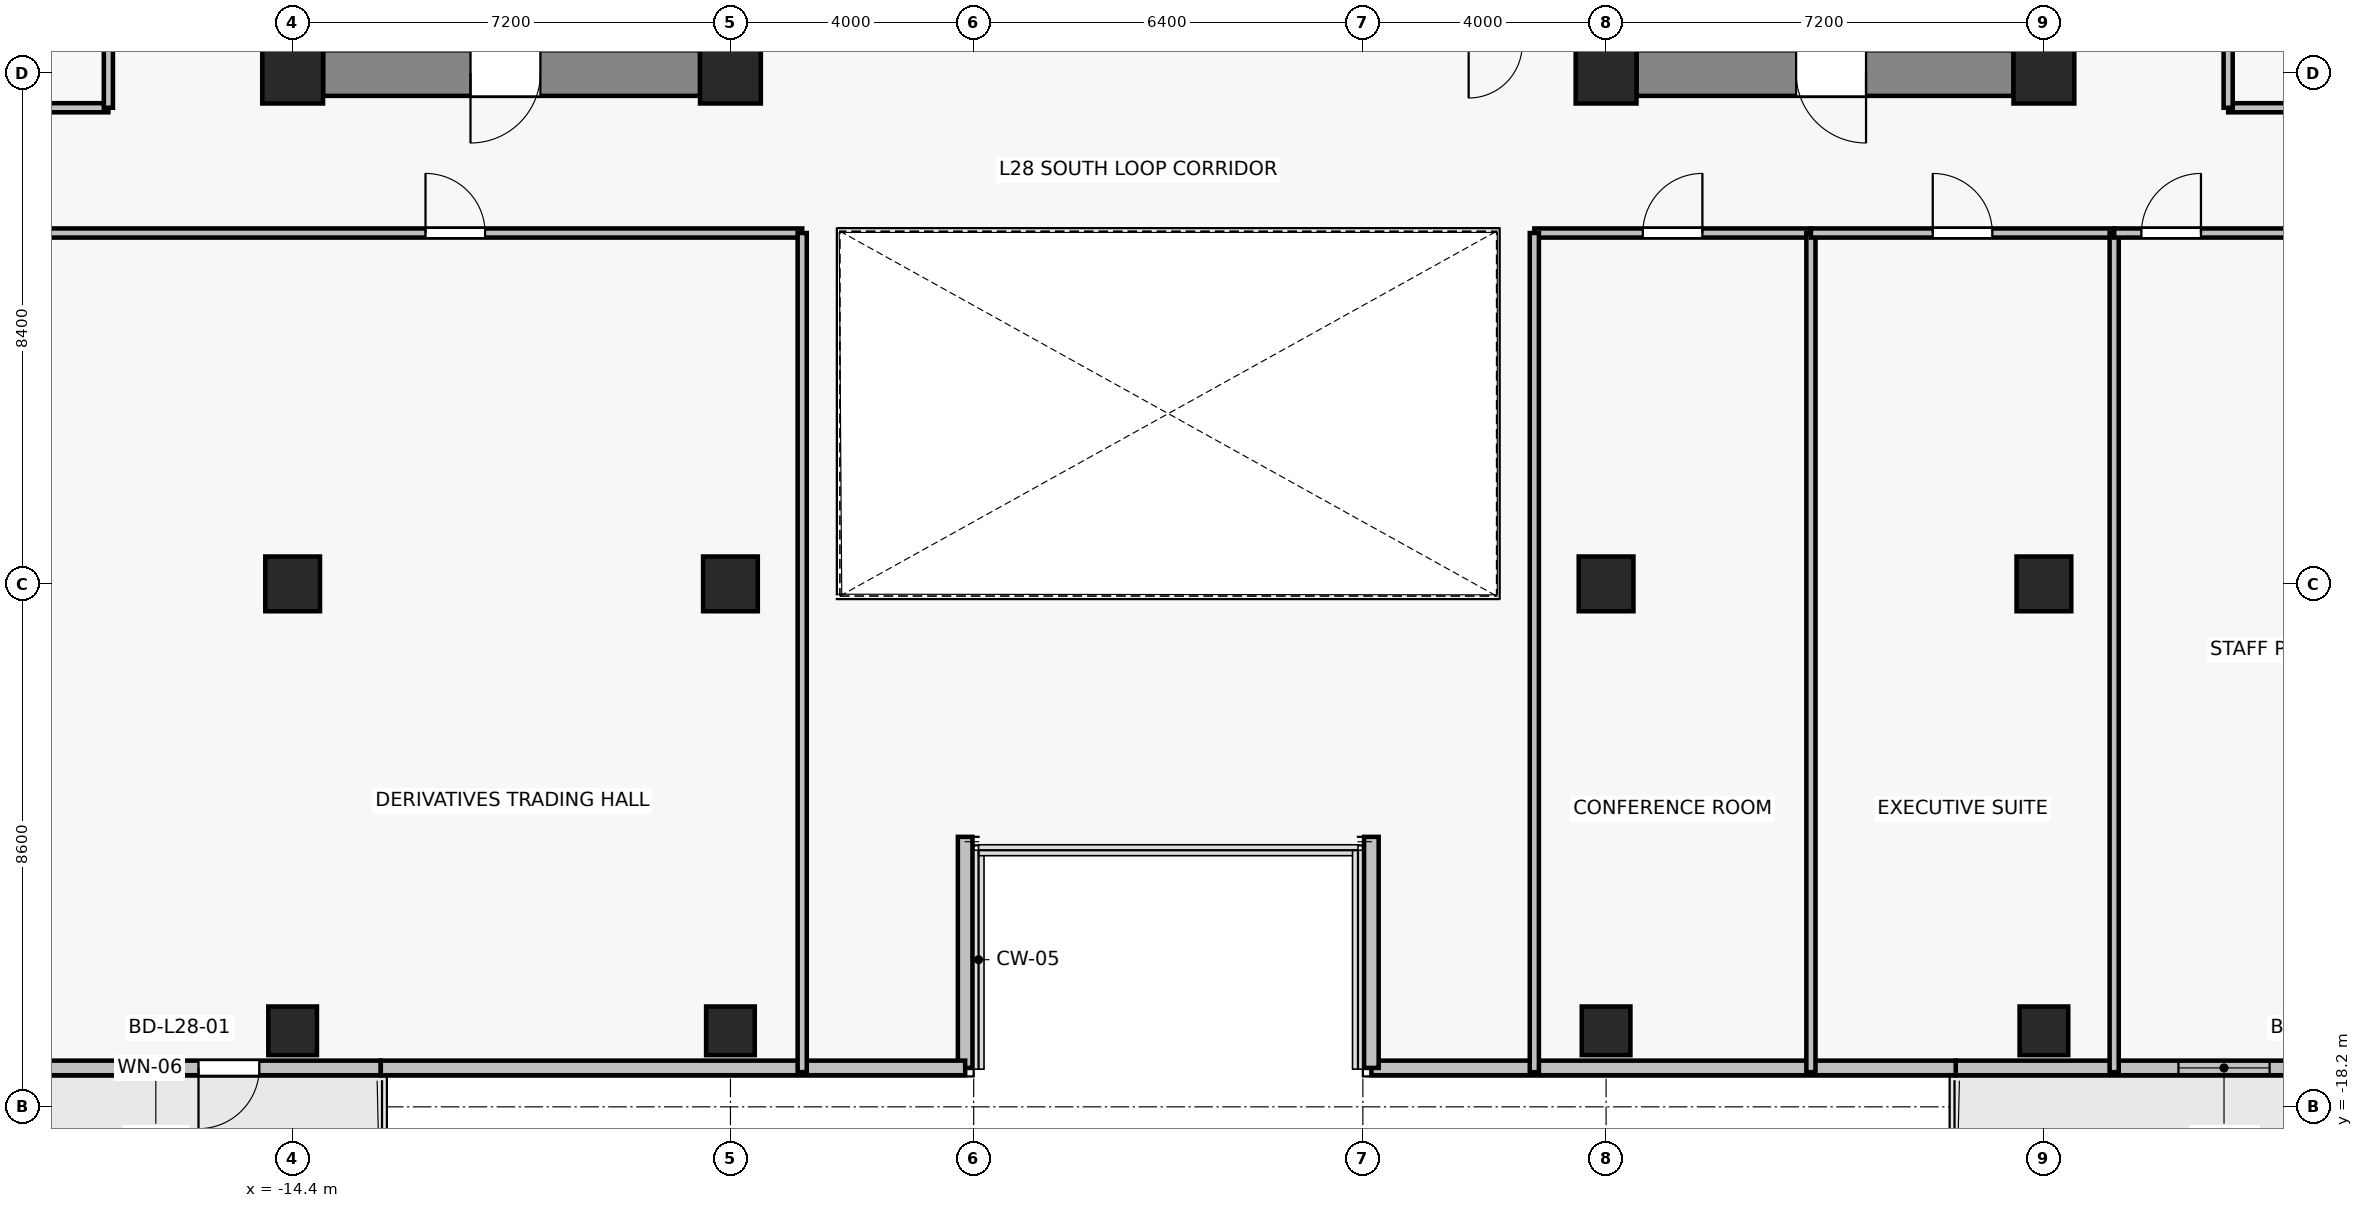
"""IFC4 building model, lengths in metres.
Left out: names, types, materials, properties, quantities, classifications, styles, units other than length and angle.
Written with IfcOpenShell. Run it as: python <this file> out.ifc"""

import sys

from ifc_helpers import new_model, si_unit, direction, frame, frame_2d, origin, origin_2d, place, context, subcontext, project, spatial, rectangle, extrude, source, transform, mapped, element, fill, save


model = new_model("IFC4")
c1 = context("Model", 3, precision=1e-05, world=origin(), true_north=direction((0.0, 1.0)))
c2 = subcontext(c1, "Body", "Model", "MODEL_VIEW")
j1 = project(units=[si_unit("LENGTHUNIT", "METRE"), si_unit("PLANEANGLEUNIT", "RADIAN")], contexts=[c1])
p1 = place(None, origin())
s1 = spatial("IfcSite", under=j1, at=p1, CompositionType="ELEMENT")
p2 = place(p1, origin())
s2 = spatial("IfcBuilding", under=s1, at=p2, CompositionType="ELEMENT")
p3 = place(p2, frame((0.0, 0.0, 103.3)))
s3 = spatial("IfcBuildingStorey", under=s2, at=p3, CompositionType="ELEMENT", Elevation=103.3)
for number, where, z_axis, x_axis in (
    (1, (-14.4, -1.2, 0.0), (0.0, 0.0, 1.0), (1.0, 0.0, 0.0)),
    (2, (-7.2, -1.2, 0.0), (0.0, 0.0, 1.0), (1.0, 0.0, 0.0)),
    (3, (7.2, -1.2, 0.0), (0.0, 0.0, 1.0), (1.0, 0.0, 0.0)),
    (4, (14.4, -1.2, 0.0), (0.0, 0.0, 1.0), (1.0, 0.0, 0.0)),
):
    element("IfcColumn", number, at=place(p3, frame(where, z_axis=z_axis, x_axis=x_axis)), inside=s3, PredefinedType="COLUMN", context=c2, shape_type="SweptSolid", body=[
        extrude(rectangle(XDim=1.0, YDim=1.0, at=origin_2d()), origin(), (0.0, 0.0, 1.0), 3.3),
    ])
for number, where, z_axis, x_axis in (
    (5, (-14.4, -9.6, 0.0), (0.0, 0.0, 1.0), (1.0, 0.0, 0.0)),
    (6, (-7.2, -9.6, 0.0), (0.0, 0.0, 1.0), (1.0, 0.0, 0.0)),
    (7, (7.2, -9.6, 0.0), (0.0, 0.0, 1.0), (1.0, 0.0, 0.0)),
    (8, (14.4, -9.6, 0.0), (0.0, 0.0, 1.0), (1.0, 0.0, 0.0)),
):
    element("IfcColumn", number, at=place(p3, frame(where, z_axis=z_axis, x_axis=x_axis)), inside=s3, PredefinedType="COLUMN", context=c2, shape_type="SweptSolid", body=[
        extrude(rectangle(XDim=0.9, YDim=0.9, at=origin_2d()), origin(), (0.0, 0.0, 1.0), 3.3),
    ])
for number, where, z_axis, x_axis in (
    (9, (-14.4, -16.95, 0.0), (0.0, 0.0, 1.0), (1.0, 0.0, 0.0)),
    (10, (-7.2, -16.95, 0.0), (0.0, 0.0, 1.0), (1.0, 0.0, 0.0)),
    (11, (7.2, -16.95, 0.0), (0.0, 0.0, 1.0), (1.0, 0.0, 0.0)),
    (12, (14.4, -16.95, 0.0), (0.0, 0.0, 1.0), (1.0, 0.0, 0.0)),
):
    element("IfcColumn", number, at=place(p3, frame(where, z_axis=z_axis, x_axis=x_axis)), inside=s3, PredefinedType="COLUMN", context=c2, shape_type="SweptSolid", body=[
        extrude(rectangle(XDim=0.8, YDim=0.8, at=origin_2d()), origin(), (0.0, 0.0, 1.0), 3.3),
    ])
p4 = place(p3, frame((-7.7, -1.2, 0.0), z_axis=(0.0, 0.0, 1.0), x_axis=(-1.0, 0.0, 0.0)))
e13 = element("IfcWall", 13, at=p4, inside=s3, PredefinedType="SHEAR", context=c2, shape_type="SweptSolid", body=[
    extrude(rectangle(XDim=6.2, YDim=0.75, at=frame_2d((3.1, 0.0))), origin(), (0.0, 0.0, 1.0), 3.075),
])
p5 = place(p4, frame((2.625, 0.0, 0.0)))
e14 = element("IfcOpeningElement", 14, at=p5, cuts=e13, PredefinedType="OPENING", context=c2, shape_type="SweptSolid", body=[
    extrude(rectangle(XDim=1.15, YDim=2.15, at=frame_2d((0.575, 1.075))), frame((0.0, 0.385, 0.0), z_axis=(0.0, -1.0, 0.0), x_axis=(1.0, 0.0, 0.0)), (0.0, 0.0, 1.0), 0.77),
])
p6 = place(p3, frame((13.9, -1.2, 0.0), z_axis=(0.0, 0.0, 1.0), x_axis=(-1.0, 0.0, 0.0)))
e15 = element("IfcWall", 15, at=p6, inside=s3, PredefinedType="SHEAR", context=c2, shape_type="SweptSolid", body=[
    extrude(rectangle(XDim=6.2, YDim=0.75, at=frame_2d((3.1, 0.0))), origin(), (0.0, 0.0, 1.0), 3.075),
])
p7 = place(p6, frame((2.425, 0.0, 0.0)))
e16 = element("IfcOpeningElement", 16, at=p7, cuts=e15, PredefinedType="OPENING", context=c2, shape_type="SweptSolid", body=[
    extrude(rectangle(XDim=1.15, YDim=2.15, at=frame_2d((0.575, 1.075))), frame((0.0, 0.385, 0.0), z_axis=(0.0, -1.0, 0.0), x_axis=(1.0, 0.0, 0.0)), (0.0, 0.0, 1.0), 0.77),
])
p8 = place(p3, frame((-12.95, -17.56, 0.0), z_axis=(0.0, 0.0, 1.0), x_axis=(-1.0, 0.0, 0.0)))
e17 = element("IfcWall", 17, at=p8, inside=s3, PredefinedType="SOLIDWALL", context=c2, shape_type="SweptSolid", body=[
    extrude(rectangle(XDim=7.4, YDim=0.24, at=frame_2d((3.7, 0.0))), origin(), (0.0, 0.0, 1.0), 2.665),
])
p9 = place(p8, frame((1.998, 0.0, 0.0)))
e18 = element("IfcOpeningElement", 18, at=p9, cuts=e17, PredefinedType="OPENING", context=c2, shape_type="SweptSolid", body=[
    extrude(rectangle(XDim=1.0, YDim=2.2, at=frame_2d((0.5, 1.1))), frame((0.0, 0.13, 0.0), z_axis=(0.0, -1.0, 0.0), x_axis=(1.0, 0.0, 0.0)), (0.0, 0.0, 1.0), 0.26),
])
p10 = place(p8, frame((3.348, 0.0, 0.85)))
e19 = element("IfcOpeningElement", 19, at=p10, cuts=e17, PredefinedType="OPENING", context=c2, shape_type="SweptSolid", body=[
    extrude(rectangle(XDim=0.9, YDim=1.35, at=frame_2d((0.45, 0.675))), frame((0.0, 0.13, 0.0), z_axis=(0.0, -1.0, 0.0), x_axis=(1.0, 0.0, 0.0)), (0.0, 0.0, 1.0), 0.26),
])
p11 = place(p3, frame((20.35, -17.56, 0.0), z_axis=(0.0, 0.0, 1.0), x_axis=(-1.0, 0.0, 0.0)))
e20 = element("IfcWall", 20, at=p11, inside=s3, PredefinedType="SOLIDWALL", context=c2, shape_type="SweptSolid", body=[
    extrude(rectangle(XDim=7.4, YDim=0.24, at=frame_2d((3.7, 0.0))), origin(), (0.0, 0.0, 1.0), 2.665),
])
p12 = place(p11, frame((0.888, 0.0, 0.0)))
e21 = element("IfcOpeningElement", 21, at=p12, cuts=e20, PredefinedType="OPENING", context=c2, shape_type="SweptSolid", body=[
    extrude(rectangle(XDim=1.0, YDim=2.2, at=frame_2d((0.5, 1.1))), frame((0.0, 0.13, 0.0), z_axis=(0.0, -1.0, 0.0), x_axis=(1.0, 0.0, 0.0)), (0.0, 0.0, 1.0), 0.26),
])
p13 = place(p11, frame((2.238, 0.0, 0.85)))
e22 = element("IfcOpeningElement", 22, at=p13, cuts=e20, PredefinedType="OPENING", context=c2, shape_type="SweptSolid", body=[
    extrude(rectangle(XDim=1.5, YDim=1.6, at=frame_2d((0.75, 0.8))), frame((0.0, 0.13, 0.0), z_axis=(0.0, -1.0, 0.0), x_axis=(1.0, 0.0, 0.0)), (0.0, 0.0, 1.0), 0.26),
])
p14 = place(p3, frame((3.34, -17.56, 0.0), z_axis=(0.0, 0.0, 1.0), x_axis=(1.0, 0.0, 0.0)))
e23 = element("IfcWall", 23, at=p14, inside=s3, PredefinedType="SOLIDWALL", context=c2, shape_type="SweptSolid", body=[
    extrude(rectangle(XDim=9.61, YDim=0.24, at=frame_2d((4.805, 0.0))), origin(), (0.0, 0.0, 1.0), 2.665),
])
for number, where, z_axis, x_axis in (
    (24, (3.34, -13.76, 0.0), (0.0, 0.0, 1.0), (0.0, -1.0, 0.0)),
    (25, (-3.34, -17.56, 0.0), (0.0, 0.0, 1.0), (0.0, 1.0, 0.0)),
):
    element("IfcWall", number, at=place(p3, frame(where, z_axis=z_axis, x_axis=x_axis)), inside=s3, PredefinedType="SOLIDWALL", context=c2, shape_type="SweptSolid", body=[
        extrude(rectangle(XDim=3.8, YDim=0.24, at=frame_2d((1.9, 0.0))), origin(), (0.0, 0.0, 1.0), 2.515),
    ])
p15 = place(p3, frame((-12.95, -17.56, 0.0), z_axis=(0.0, 0.0, 1.0), x_axis=(1.0, 0.0, 0.0)))
e26 = element("IfcWall", 26, at=p15, inside=s3, PredefinedType="SOLIDWALL", context=c2, shape_type="SweptSolid", body=[
    extrude(rectangle(XDim=9.61, YDim=0.24, at=frame_2d((4.805, 0.0))), origin(), (0.0, 0.0, 1.0), 2.665),
])
p16 = place(p3, frame((-29.53, -3.83, 0.0), z_axis=(0.0, 0.0, 1.0), x_axis=(1.0, 0.0, 0.0)))
e27 = element("IfcWall", 27, at=p16, inside=s3, PredefinedType="PARTITIONING", context=c2, shape_type="SweptSolid", body=[
    extrude(rectangle(XDim=23.51, YDim=0.15, at=frame_2d((11.755, 0.0))), origin(), (0.0, 0.0, 1.0), 2.515),
])
p17 = place(p16, frame((17.315, 0.0, 0.0)))
e28 = element("IfcOpeningElement", 28, at=p17, cuts=e27, PredefinedType="OPENING", context=c2, shape_type="SweptSolid", body=[
    extrude(rectangle(XDim=0.98, YDim=2.15, at=frame_2d((0.49, 1.075))), frame((0.0, 0.085, 0.0), z_axis=(0.0, -1.0, 0.0), x_axis=(1.0, 0.0, 0.0)), (0.0, 0.0, 1.0), 0.17),
])
p18 = place(p3, frame((-6.02, -3.83, 0.0), z_axis=(0.0, 0.0, 1.0), x_axis=(0.0, -1.0, 0.0)))
e29 = element("IfcWall", 29, at=p18, inside=s3, PredefinedType="PARTITIONING", context=c2, shape_type="SweptSolid", body=[
    extrude(rectangle(XDim=13.8, YDim=0.15, at=frame_2d((6.9, 0.0))), origin(), (0.0, 0.0, 1.0), 2.515),
])
p19 = place(p3, frame((6.02, -3.83, 0.0), z_axis=(0.0, 0.0, 1.0), x_axis=(1.0, 0.0, 0.0)))
e30 = element("IfcWall", 30, at=p19, inside=s3, PredefinedType="PARTITIONING", context=c2, shape_type="SweptSolid", body=[
    extrude(rectangle(XDim=4.548, YDim=0.15, at=frame_2d((2.274, 0.0))), origin(), (0.0, 0.0, 1.0), 2.515),
])
p20 = place(p19, frame((1.784, 0.0, 0.0)))
e31 = element("IfcOpeningElement", 31, at=p20, cuts=e30, PredefinedType="OPENING", context=c2, shape_type="SweptSolid", body=[
    extrude(rectangle(XDim=0.98, YDim=2.15, at=frame_2d((0.49, 1.075))), frame((0.0, 0.085, 0.0), z_axis=(0.0, -1.0, 0.0), x_axis=(1.0, 0.0, 0.0)), (0.0, 0.0, 1.0), 0.17),
])
for number, where, z_axis, x_axis in (
    (32, (6.02, -17.63, 0.0), (0.0, 0.0, 1.0), (0.0, 1.0, 0.0)),
    (33, (10.568, -3.83, 0.0), (0.0, 0.0, 1.0), (0.0, -1.0, 0.0)),
):
    element("IfcWall", number, at=place(p3, frame(where, z_axis=z_axis, x_axis=x_axis)), inside=s3, PredefinedType="PARTITIONING", context=c2, shape_type="SweptSolid", body=[
        extrude(rectangle(XDim=13.8, YDim=0.15, at=frame_2d((6.9, 0.0))), origin(), (0.0, 0.0, 1.0), 2.515),
    ])
p21 = place(p3, frame((10.568, -3.83, 0.0), z_axis=(0.0, 0.0, 1.0), x_axis=(1.0, 0.0, 0.0)))
e34 = element("IfcWall", 34, at=p21, inside=s3, PredefinedType="PARTITIONING", context=c2, shape_type="SweptSolid", body=[
    extrude(rectangle(XDim=4.987, YDim=0.15, at=frame_2d((2.494, 0.0))), origin(), (0.0, 0.0, 1.0), 2.515),
])
p22 = place(p21, frame((2.004, 0.0, 0.0)))
e35 = element("IfcOpeningElement", 35, at=p22, cuts=e34, PredefinedType="OPENING", context=c2, shape_type="SweptSolid", body=[
    extrude(rectangle(XDim=0.98, YDim=2.15, at=frame_2d((0.49, 1.075))), frame((0.0, 0.085, 0.0), z_axis=(0.0, -1.0, 0.0), x_axis=(1.0, 0.0, 0.0)), (0.0, 0.0, 1.0), 0.17),
])
p23 = place(p3, frame((15.556, -3.83, 0.0), z_axis=(0.0, 0.0, 1.0), x_axis=(0.0, -1.0, 0.0)))
e36 = element("IfcWall", 36, at=p23, inside=s3, PredefinedType="PARTITIONING", context=c2, shape_type="SweptSolid", body=[
    extrude(rectangle(XDim=13.8, YDim=0.15, at=frame_2d((6.9, 0.0))), origin(), (0.0, 0.0, 1.0), 2.515),
])
p24 = place(p3, frame((15.556, -3.83, 0.0), z_axis=(0.0, 0.0, 1.0), x_axis=(1.0, 0.0, 0.0)))
e37 = element("IfcWall", 37, at=p24, inside=s3, PredefinedType="PARTITIONING", context=c2, shape_type="SweptSolid", body=[
    extrude(rectangle(XDim=5.426, YDim=0.15, at=frame_2d((2.713, 0.0))), origin(), (0.0, 0.0, 1.0), 3.075),
])
p25 = place(p24, frame((0.448, 0.0, 0.0)))
e38 = element("IfcOpeningElement", 38, at=p25, cuts=e37, PredefinedType="OPENING", context=c2, shape_type="SweptSolid", body=[
    extrude(rectangle(XDim=0.98, YDim=2.15, at=frame_2d((0.49, 1.075))), frame((0.0, 0.085, 0.0), z_axis=(0.0, -1.0, 0.0), x_axis=(1.0, 0.0, 0.0)), (0.0, 0.0, 1.0), 0.17),
])
p26 = place(p3, frame((-17.43, -1.77, 0.0), z_axis=(0.0, 0.0, 1.0), x_axis=(-1.0, 0.0, 0.0)))
e39 = element("IfcWall", 39, at=p26, inside=s3, PredefinedType="PARTITIONING", context=c2, shape_type="SweptSolid", body=[
    extrude(rectangle(XDim=12.1, YDim=0.15, at=frame_2d((6.05, 0.0))), origin(), (0.0, 0.0, 1.0), 2.515),
])
p27 = place(p3, frame((-17.43, 2.987, 0.0), z_axis=(0.0, 0.0, 1.0), x_axis=(0.0, -1.0, 0.0)))
e40 = element("IfcWall", 40, at=p27, inside=s3, PredefinedType="PARTITIONING", context=c2, shape_type="SweptSolid", body=[
    extrude(rectangle(XDim=4.757, YDim=0.15, at=frame_2d((2.378, 0.0))), origin(), (0.0, 0.0, 1.0), 2.515),
])
p28 = place(p27, frame((1.888, 0.0, 0.0)))
e41 = element("IfcOpeningElement", 41, at=p28, cuts=e40, PredefinedType="OPENING", context=c2, shape_type="SweptSolid", body=[
    extrude(rectangle(XDim=0.98, YDim=2.15, at=frame_2d((0.49, 1.075))), frame((0.0, 0.085, 0.0), z_axis=(0.0, -1.0, 0.0), x_axis=(1.0, 0.0, 0.0)), (0.0, 0.0, 1.0), 0.17),
])
p29 = place(p3, frame((25.53, -1.77, 0.0), z_axis=(0.0, 0.0, 1.0), x_axis=(-1.0, 0.0, 0.0)))
e42 = element("IfcWall", 42, at=p29, inside=s3, PredefinedType="PARTITIONING", context=c2, shape_type="SweptSolid", body=[
    extrude(rectangle(XDim=8.1, YDim=0.15, at=frame_2d((4.05, 0.0))), origin(), (0.0, 0.0, 1.0), 2.515),
])
p30 = place(p3, frame((17.43, -1.77, 0.0), z_axis=(0.0, 0.0, 1.0), x_axis=(0.0, 1.0, 0.0)))
e43 = element("IfcWall", 43, at=p30, inside=s3, PredefinedType="PARTITIONING", context=c2, shape_type="SweptSolid", body=[
    extrude(rectangle(XDim=15.65, YDim=0.15, at=frame_2d((7.825, 0.0))), origin(), (0.0, 0.0, 1.0), 2.515),
])
p31 = place(p30, frame((7.335, 0.0, 0.0)))
e44 = element("IfcOpeningElement", 44, at=p31, cuts=e43, PredefinedType="OPENING", context=c2, shape_type="SweptSolid", body=[
    extrude(rectangle(XDim=0.98, YDim=2.15, at=frame_2d((0.49, 1.075))), frame((0.0, 0.085, 0.0), z_axis=(0.0, -1.0, 0.0), x_axis=(1.0, 0.0, 0.0)), (0.0, 0.0, 1.0), 0.17),
])
m1 = source(origin(), c2, "Body", "SweptSolid", [
    extrude(rectangle(XDim=1.0, YDim=2.2, at=frame_2d((0.5, 1.1))), frame((0.0, 0.025, 0.0), z_axis=(0.0, -1.0, 0.0), x_axis=(1.0, 0.0, 0.0)), (0.0, 0.0, 1.0), 0.05),
])
p32 = place(p9, origin())
e45 = element("IfcDoor", 45, at=p32, inside=s3, OperationType="SINGLE_SWING_RIGHT", PredefinedType="DOOR", context=c2, shape_type="MappedRepresentation", body=[
    mapped(m1, transform((0.0, 0.0, 0.0), x_axis=(1.0, 0.0, 0.0), y_axis=(0.0, 1.0, 0.0), z_axis=(0.0, 0.0, 1.0), scale=1.0)),
])
fill(e18, e45)
m2 = source(origin(), c2, "Body", "SweptSolid", [
    extrude(rectangle(XDim=0.9, YDim=1.35, at=frame_2d((0.45, 0.675))), frame((0.0, 0.03, 0.0), z_axis=(0.0, -1.0, 0.0), x_axis=(1.0, 0.0, 0.0)), (0.0, 0.0, 1.0), 0.06),
])
p33 = place(p10, origin())
e46 = element("IfcWindow", 46, at=p33, inside=s3, PartitioningType="SINGLE_PANEL", PredefinedType="WINDOW", context=c2, shape_type="MappedRepresentation", body=[
    mapped(m2, transform((0.0, 0.0, 0.0), x_axis=(1.0, 0.0, 0.0), y_axis=(0.0, 1.0, 0.0), z_axis=(0.0, 0.0, 1.0), scale=1.0)),
])
fill(e19, e46)
m3 = source(origin(), c2, "Body", "SweptSolid", [
    extrude(rectangle(XDim=1.5, YDim=1.6, at=frame_2d((0.75, 0.8))), frame((0.0, 0.03, 0.0), z_axis=(0.0, -1.0, 0.0), x_axis=(1.0, 0.0, 0.0)), (0.0, 0.0, 1.0), 0.06),
])
p34 = place(p13, origin())
e47 = element("IfcWindow", 47, at=p34, inside=s3, PartitioningType="SINGLE_PANEL", PredefinedType="WINDOW", context=c2, shape_type="MappedRepresentation", body=[
    mapped(m3, transform((0.0, 0.0, 0.0), x_axis=(1.0, 0.0, 0.0), y_axis=(0.0, 1.0, 0.0), z_axis=(0.0, 0.0, 1.0), scale=1.0)),
])
fill(e22, e47)
m4 = source(origin(), c2, "Body", "SweptSolid", [
    extrude(rectangle(XDim=1.15, YDim=2.15, at=frame_2d((0.575, 1.075))), frame((0.0, 0.025, 0.0), z_axis=(0.0, -1.0, 0.0), x_axis=(1.0, 0.0, 0.0)), (0.0, 0.0, 1.0), 0.05),
])
p35 = place(p5, origin())
e48 = element("IfcDoor", 48, at=p35, inside=s3, OperationType="SINGLE_SWING_RIGHT", PredefinedType="DOOR", context=c2, shape_type="MappedRepresentation", body=[
    mapped(m4, transform((0.0, 0.0, 0.0), x_axis=(1.0, 0.0, 0.0), y_axis=(0.0, 1.0, 0.0), z_axis=(0.0, 0.0, 1.0), scale=1.0)),
])
fill(e14, e48)
p36 = place(p7, origin())
e49 = element("IfcDoor", 49, at=p36, inside=s3, OperationType="SINGLE_SWING_LEFT", PredefinedType="DOOR", context=c2, shape_type="MappedRepresentation", body=[
    mapped(m4, transform((0.0, 0.0, 0.0), x_axis=(1.0, 0.0, 0.0), y_axis=(0.0, 1.0, 0.0), z_axis=(0.0, 0.0, 1.0), scale=1.0)),
])
fill(e16, e49)
m5 = source(origin(), c2, "Body", "SweptSolid", [
    extrude(rectangle(XDim=0.98, YDim=2.15, at=frame_2d((0.49, 1.075))), frame((0.0, 0.025, 0.0), z_axis=(0.0, -1.0, 0.0), x_axis=(1.0, 0.0, 0.0)), (0.0, 0.0, 1.0), 0.05),
])
p37 = place(p17, origin())
e50 = element("IfcDoor", 50, at=p37, inside=s3, OperationType="SINGLE_SWING_LEFT", PredefinedType="DOOR", context=c2, shape_type="MappedRepresentation", body=[
    mapped(m5, transform((0.0, 0.0, 0.0), x_axis=(1.0, 0.0, 0.0), y_axis=(0.0, 1.0, 0.0), z_axis=(0.0, 0.0, 1.0), scale=1.0)),
])
fill(e28, e50)
p38 = place(p20, origin())
e51 = element("IfcDoor", 51, at=p38, inside=s3, OperationType="SINGLE_SWING_RIGHT", PredefinedType="DOOR", context=c2, shape_type="MappedRepresentation", body=[
    mapped(m5, transform((0.0, 0.0, 0.0), x_axis=(1.0, 0.0, 0.0), y_axis=(0.0, 1.0, 0.0), z_axis=(0.0, 0.0, 1.0), scale=1.0)),
])
fill(e31, e51)
p39 = place(p22, origin())
e52 = element("IfcDoor", 52, at=p39, inside=s3, OperationType="SINGLE_SWING_LEFT", PredefinedType="DOOR", context=c2, shape_type="MappedRepresentation", body=[
    mapped(m5, transform((0.0, 0.0, 0.0), x_axis=(1.0, 0.0, 0.0), y_axis=(0.0, 1.0, 0.0), z_axis=(0.0, 0.0, 1.0), scale=1.0)),
])
fill(e35, e52)
p40 = place(p25, origin())
e53 = element("IfcDoor", 53, at=p40, inside=s3, OperationType="SINGLE_SWING_RIGHT", PredefinedType="DOOR", context=c2, shape_type="MappedRepresentation", body=[
    mapped(m5, transform((0.0, 0.0, 0.0), x_axis=(1.0, 0.0, 0.0), y_axis=(0.0, 1.0, 0.0), z_axis=(0.0, 0.0, 1.0), scale=1.0)),
])
fill(e38, e53)
save(model, sys.argv[1])
